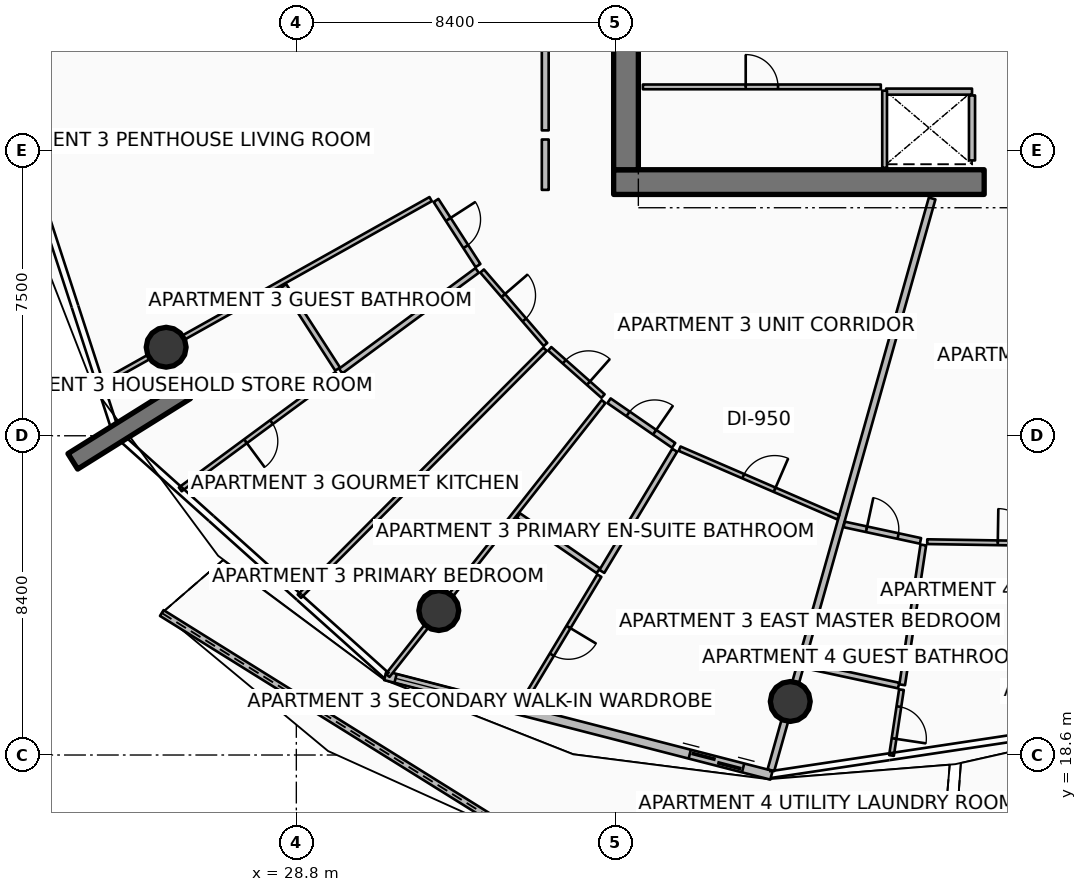
"""IFC4 building model, lengths in metres.
Left out: names, types, materials, properties, quantities, classifications, styles, units other than length and angle.
Written with IfcOpenShell. Run it as: python <this file> out.ifc"""

import sys

from ifc_helpers import new_model, si_unit, direction, frame, frame_2d, origin, origin_2d, place, context, subcontext, project, spatial, polyline, rectangle, circle, outline, extrude, element, fill, save


model = new_model("IFC4")
c1 = context("Model", 3, precision=1e-05, world=origin(), true_north=direction((0.0, 1.0)))
c2 = subcontext(c1, "Body", "Model", "MODEL_VIEW")
j1 = project(units=[si_unit("LENGTHUNIT", "METRE"), si_unit("PLANEANGLEUNIT", "RADIAN")], contexts=[c1])
p1 = place(None, origin())
s1 = spatial("IfcSite", under=j1, at=p1, CompositionType="ELEMENT")
p2 = place(p1, origin())
s2 = spatial("IfcBuilding", under=s1, at=p2, CompositionType="ELEMENT")
p3 = place(p2, frame((0.0, 0.0, 176.55)))
s3 = spatial("IfcBuildingStorey", under=s2, at=p3, CompositionType="ELEMENT", Elevation=176.55)
p4 = place(p3, frame((37.15, 33.675, 0.0), z_axis=(0.0, 0.0, 1.0), x_axis=(1.0, 0.0, 0.0)))
e1 = element("IfcWall", 1, at=p4, inside=s3, PredefinedType="SHEAR", context=c2, shape_type="SweptSolid", body=[
    extrude(rectangle(XDim=9.75, YDim=0.65, at=frame_2d((4.875, 0.0))), origin(), (0.0, 0.0, 1.0), 3.75),
])
p5 = place(p3, frame((37.475, 34.0, 0.0), z_axis=(0.0, 0.0, 1.0), x_axis=(0.0, 1.0, 0.0)))
e2 = element("IfcWall", 2, at=p5, inside=s3, PredefinedType="SHEAR", context=c2, shape_type="SweptSolid", body=[
    extrude(rectangle(XDim=16.0, YDim=0.65, at=frame_2d((8.0, 0.0))), origin(), (0.0, 0.0, 1.0), 3.75),
])
p6 = place(p3, frame((25.886, 28.182, 0.0), z_axis=(0.0, 0.0, 1.0), x_axis=(-0.848033572426, -0.529942506352, 0.0)))
e3 = element("IfcWall", 3, at=p6, inside=s3, PredefinedType="SOLIDWALL", context=c2, shape_type="SweptSolid", body=[
    extrude(rectangle(XDim=3.5, YDim=0.48, at=frame_2d((1.75, 0.0))), origin(), (0.0, 0.0, 1.0), 3.75),
])
for number, where, z_axis, x_axis in (
    (4, (25.375, 29.329, 0.0), (0.0, 0.0, 1.0), (1.0, 0.0, 0.0)),
    (5, (32.549, 22.401, 0.0), (0.0, 0.0, 1.0), (1.0, 0.0, 0.0)),
    (6, (41.798, 20.008, 0.0), (0.0, 0.0, 1.0), (1.0, 0.0, 0.0)),
):
    element("IfcColumn", number, at=place(p3, frame(where, z_axis=z_axis, x_axis=x_axis)), inside=s3, PredefinedType="COLUMN", context=c2, shape_type="SweptSolid", body=[
        extrude(circle(Radius=0.525, at=origin_2d()), origin(), (0.0, 0.0, 1.0), 3.5),
    ])
p7 = place(p3, frame((25.26, 22.336, 0.0), z_axis=(0.0, 0.0, 1.0), x_axis=(0.84875531388, -0.528785795158, 0.0)))
e7 = element("IfcWall", 7, at=p7, inside=s3, PredefinedType="PARAPET", context=c2, shape_type="SweptSolid", body=[
    extrude(outline(polyline([(0.0, 0.0), (11.257, 0.0), (11.257, 1.832), (5.628, 1.696), (0.0, 1.497), (0.0, 0.0)])), frame((0.0, 0.09, 0.0), z_axis=(0.0, -1.0, 0.0), x_axis=(1.0, 0.0, 0.0)), (0.0, 0.0, 1.0), 0.18),
])
p8 = place(p3, frame((46.108, 15.929, 0.0), z_axis=(0.0, 0.0, 1.0), x_axis=(0.954909554677, 0.296896854793, 0.0)))
e8 = element("IfcWall", 8, at=p8, inside=s3, PredefinedType="PARAPET", context=c2, shape_type="SweptSolid", body=[
    extrude(outline(polyline([(0.0, 0.0), (9.736, 0.0), (9.736, 1.348), (4.868, 1.562), (0.0, 1.747), (0.0, 0.0)])), frame((0.0, 0.09, 0.0), z_axis=(0.0, -1.0, 0.0), x_axis=(1.0, 0.0, 0.0)), (0.0, 0.0, 1.0), 0.18),
])
p9 = place(p3, frame((31.14, 20.687, 0.0), z_axis=(0.0, 0.0, 1.0), x_axis=(0.968374028006, -0.249502989727, 0.0)))
e9 = element("IfcWall", 9, at=p9, inside=s3, PredefinedType="SOLIDWALL", context=c2, shape_type="SweptSolid", body=[
    extrude(rectangle(XDim=10.494, YDim=0.24, at=frame_2d((5.247, 0.0))), origin(), (0.0, 0.0, 1.0), 2.45),
])
p10 = place(p9, frame((8.274, 0.0, 0.0)))
e10 = element("IfcOpeningElement", 10, at=p10, cuts=e9, PredefinedType="OPENING", context=c2, shape_type="SweptSolid", body=[
    extrude(rectangle(XDim=1.45, YDim=2.15, at=frame_2d((0.725, 1.075))), frame((0.0, 0.13, 0.0), z_axis=(0.0, -1.0, 0.0), x_axis=(1.0, 0.0, 0.0)), (0.0, 0.0, 1.0), 0.26),
])
p11 = place(p9, frame((0.28, 0.0, 0.65)))
e11 = element("IfcOpeningElement", 11, at=p11, cuts=e9, PredefinedType="OPENING", context=c2, shape_type="SweptSolid", body=[
    extrude(rectangle(XDim=1.6, YDim=1.5, at=frame_2d((0.8, 0.75))), frame((0.0, 0.13, 0.0), z_axis=(0.0, -1.0, 0.0), x_axis=(1.0, 0.0, 0.0)), (0.0, 0.0, 1.0), 0.26),
])
p12 = place(p3, frame((44.32, 36.055, 0.0), z_axis=(0.0, 0.0, 1.0), x_axis=(1.0, 0.0, 0.0)))
e12 = element("IfcWall", 12, at=p12, inside=s3, PredefinedType="PARTITIONING", context=c2, shape_type="SweptSolid", body=[
    extrude(rectangle(XDim=2.26, YDim=0.16, at=frame_2d((1.13, 0.0))), origin(), (0.0, 0.0, 1.0), 3.5),
])
p13 = place(p3, frame((46.58, 34.245, 0.0), z_axis=(0.0, 0.0, 1.0), x_axis=(0.0, 1.0, 0.0)))
e13 = element("IfcWall", 13, at=p13, inside=s3, PredefinedType="PARTITIONING", context=c2, shape_type="SweptSolid", body=[
    extrude(rectangle(XDim=1.71, YDim=0.16, at=frame_2d((0.855, 0.0))), origin(), (0.0, 0.0, 1.0), 3.5),
])
p14 = place(p3, frame((44.28, 34.05, 0.0), z_axis=(0.0, 0.0, 1.0), x_axis=(0.0, 1.0, 0.0)))
e14 = element("IfcWall", 14, at=p14, inside=s3, PredefinedType="PARTITIONING", context=c2, shape_type="SweptSolid", body=[
    extrude(rectangle(XDim=2.03, YDim=0.125, at=frame_2d((1.015, 0.0))), origin(), (0.0, 0.0, 1.0), 2.94),
])
p15 = place(p3, frame((37.92, 36.18, 0.0), z_axis=(0.0, 0.0, 1.0), x_axis=(1.0, 0.0, 0.0)))
e15 = element("IfcWall", 15, at=p15, inside=s3, PredefinedType="PARTITIONING", context=c2, shape_type="SweptSolid", body=[
    extrude(rectangle(XDim=6.26, YDim=0.125, at=frame_2d((3.13, 0.0))), origin(), (0.0, 0.0, 1.0), 2.94),
])
p16 = place(p15, frame((2.705, 0.0, 0.0)))
e16 = element("IfcOpeningElement", 16, at=p16, cuts=e15, PredefinedType="OPENING", context=c2, shape_type="SweptSolid", body=[
    extrude(rectangle(XDim=0.85, YDim=2.06, at=frame_2d((0.425, 1.03))), frame((0.0, 0.073, 0.0), z_axis=(0.0, -1.0, 0.0), x_axis=(1.0, 0.0, 0.0)), (0.0, 0.0, 1.0), 0.145),
])
p17 = place(p3, frame((45.531, 33.244, 0.0), z_axis=(0.0, 0.0, 1.0), x_axis=(-0.271437162306, -0.962456163635, 0.0)))
e17 = element("IfcWall", 17, at=p17, inside=s3, PredefinedType="PARTITIONING", context=c2, shape_type="SweptSolid", body=[
    extrude(rectangle(XDim=15.63, YDim=0.18, at=frame_2d((7.815, 0.0))), origin(), (0.0, 0.0, 1.0), 2.94),
])
p18 = place(p3, frame((35.35, 40.383, 0.0), z_axis=(0.0, 0.0, 1.0), x_axis=(0.0, -1.0, 0.0)))
e18 = element("IfcWall", 18, at=p18, inside=s3, PredefinedType="PARTITIONING", context=c2, shape_type="SweptSolid", body=[
    extrude(rectangle(XDim=5.347, YDim=0.18, at=frame_2d((2.674, 0.0))), origin(), (0.0, 0.0, 1.0), 2.94),
])
p19 = place(p18, frame((2.124, 0.0, 0.0)))
e19 = element("IfcOpeningElement", 19, at=p19, cuts=e18, PredefinedType="OPENING", context=c2, shape_type="SweptSolid", body=[
    extrude(rectangle(XDim=1.1, YDim=2.1, at=frame_2d((0.55, 1.05))), frame((0.0, 0.1, 0.0), z_axis=(0.0, -1.0, 0.0), x_axis=(1.0, 0.0, 0.0)), (0.0, 0.0, 1.0), 0.2),
])
p20 = place(p3, frame((35.35, 34.796, 0.0), z_axis=(0.0, 0.0, 1.0), x_axis=(0.0, -1.0, 0.0)))
e20 = element("IfcWall", 20, at=p20, inside=s3, PredefinedType="PARTITIONING", context=c2, shape_type="SweptSolid", body=[
    extrude(rectangle(XDim=1.326, YDim=0.18, at=frame_2d((0.663, 0.0))), origin(), (0.0, 0.0, 1.0), 2.94),
])
p21 = place(p3, frame((32.334, 33.227, 0.0), z_axis=(0.0, 0.0, 1.0), x_axis=(-0.872500152392, -0.488613839424, 0.0)))
e21 = element("IfcWall", 21, at=p21, inside=s3, PredefinedType="PARTITIONING", context=c2, shape_type="SweptSolid", body=[
    extrude(rectangle(XDim=9.94, YDim=0.125, at=frame_2d((4.97, 0.0))), origin(), (0.0, 0.0, 1.0), 2.94),
])
p22 = place(p3, frame((32.476, 33.192, 0.0), z_axis=(0.0, 0.0, 1.0), x_axis=(0.542143239932, -0.840286086637, 0.0)))
e22 = element("IfcWall", 22, at=p22, inside=s3, PredefinedType="PARTITIONING", context=c2, shape_type="SweptSolid", body=[
    extrude(rectangle(XDim=2.038, YDim=0.15, at=frame_2d((1.019, 0.0))), origin(), (0.0, 0.0, 1.0), 2.94),
])
p23 = place(p22, frame((0.594, 0.0, 0.0)))
e23 = element("IfcOpeningElement", 23, at=p23, cuts=e22, PredefinedType="OPENING", context=c2, shape_type="SweptSolid", body=[
    extrude(rectangle(XDim=0.85, YDim=2.06, at=frame_2d((0.425, 1.03))), frame((0.0, 0.085, 0.0), z_axis=(0.0, -1.0, 0.0), x_axis=(1.0, 0.0, 0.0)), (0.0, 0.0, 1.0), 0.17),
])
p24 = place(p3, frame((28.471, 30.949, 0.0), z_axis=(0.0, 0.0, 1.0), x_axis=(0.542080018781, -0.840326872853, 0.0)))
e24 = element("IfcWall", 24, at=p24, inside=s3, PredefinedType="PARTITIONING", context=c2, shape_type="SweptSolid", body=[
    extrude(rectangle(XDim=2.611, YDim=0.15, at=frame_2d((1.306, 0.0))), origin(), (0.0, 0.0, 1.0), 2.94),
])
p25 = place(p3, frame((33.557, 31.35, 0.0), z_axis=(0.0, 0.0, 1.0), x_axis=(-0.804841149106, -0.593490290322, 0.0)))
e25 = element("IfcWall", 25, at=p25, inside=s3, PredefinedType="PARTITIONING", context=c2, shape_type="SweptSolid", body=[
    extrude(rectangle(XDim=4.46, YDim=0.15, at=frame_2d((2.23, 0.0))), origin(), (0.0, 0.0, 1.0), 2.94),
])
p26 = place(p3, frame((29.863, 28.626, 0.0), z_axis=(0.0, 0.0, 1.0), x_axis=(-0.804842237675, -0.593488814094, 0.0)))
e26 = element("IfcWall", 26, at=p26, inside=s3, PredefinedType="PARTITIONING", context=c2, shape_type="SweptSolid", body=[
    extrude(rectangle(XDim=5.115, YDim=0.125, at=frame_2d((2.558, 0.0))), origin(), (0.0, 0.0, 1.0), 2.94),
])
p27 = place(p26, frame((2.133, 0.0, 0.0)))
e27 = element("IfcOpeningElement", 27, at=p27, cuts=e26, PredefinedType="OPENING", context=c2, shape_type="SweptSolid", body=[
    extrude(rectangle(XDim=0.85, YDim=2.06, at=frame_2d((0.425, 1.03))), frame((0.0, 0.073, 0.0), z_axis=(0.0, -1.0, 0.0), x_axis=(1.0, 0.0, 0.0)), (0.0, 0.0, 1.0), 0.145),
])
p28 = place(p3, frame((35.344, 29.277, 0.0), z_axis=(0.0, 0.0, 1.0), x_axis=(-0.705226489462, -0.708982086206, 0.0)))
e28 = element("IfcWall", 28, at=p28, inside=s3, PredefinedType="PARTITIONING", context=c2, shape_type="SweptSolid", body=[
    extrude(rectangle(XDim=9.166, YDim=0.125, at=frame_2d((4.583, 0.0))), origin(), (0.0, 0.0, 1.0), 2.94),
])
p29 = place(p3, frame((33.688, 31.335, 0.0), z_axis=(0.0, 0.0, 1.0), x_axis=(0.653119308398, -0.757255022431, 0.0)))
e29 = element("IfcWall", 29, at=p29, inside=s3, PredefinedType="PARTITIONING", context=c2, shape_type="SweptSolid", body=[
    extrude(rectangle(XDim=2.553, YDim=0.125, at=frame_2d((1.277, 0.0))), origin(), (0.0, 0.0, 1.0), 2.94),
])
p30 = place(p29, frame((0.852, 0.0, 0.0)))
e30 = element("IfcOpeningElement", 30, at=p30, cuts=e29, PredefinedType="OPENING", context=c2, shape_type="SweptSolid", body=[
    extrude(rectangle(XDim=0.85, YDim=2.06, at=frame_2d((0.425, 1.03))), frame((0.0, 0.073, 0.0), z_axis=(0.0, -1.0, 0.0), x_axis=(1.0, 0.0, 0.0)), (0.0, 0.0, 1.0), 0.145),
])
p31 = place(p3, frame((35.468, 29.288, 0.0), z_axis=(0.0, 0.0, 1.0), x_axis=(0.748399816021, -0.663247853656, 0.0)))
e31 = element("IfcWall", 31, at=p31, inside=s3, PredefinedType="PARTITIONING", context=c2, shape_type="SweptSolid", body=[
    extrude(rectangle(XDim=1.875, YDim=0.125, at=frame_2d((0.938, 0.0))), origin(), (0.0, 0.0, 1.0), 2.94),
])
p32 = place(p31, frame((0.512, 0.0, 0.0)))
e32 = element("IfcOpeningElement", 32, at=p32, cuts=e31, PredefinedType="OPENING", context=c2, shape_type="SweptSolid", body=[
    extrude(rectangle(XDim=0.85, YDim=2.06, at=frame_2d((0.425, 1.03))), frame((0.0, 0.073, 0.0), z_axis=(0.0, -1.0, 0.0), x_axis=(1.0, 0.0, 0.0)), (0.0, 0.0, 1.0), 0.145),
])
p33 = place(p3, frame((36.884, 27.9, 0.0), z_axis=(0.0, 0.0, 1.0), x_axis=(-0.619094580594, -0.785316433216, 0.0)))
e33 = element("IfcWall", 33, at=p33, inside=s3, PredefinedType="PARTITIONING", context=c2, shape_type="SweptSolid", body=[
    extrude(rectangle(XDim=9.175, YDim=0.125, at=frame_2d((4.588, 0.0))), origin(), (0.0, 0.0, 1.0), 2.94),
])
p34 = place(p3, frame((37.028, 27.921, 0.0), z_axis=(0.0, 0.0, 1.0), x_axis=(0.82286796048, -0.56823262808, 0.0)))
e34 = element("IfcWall", 34, at=p34, inside=s3, PredefinedType="PARTITIONING", context=c2, shape_type="SweptSolid", body=[
    extrude(rectangle(XDim=2.066, YDim=0.15, at=frame_2d((1.033, 0.0))), origin(), (0.0, 0.0, 1.0), 2.94),
])
p35 = place(p34, frame((0.608, 0.0, 0.0)))
e35 = element("IfcOpeningElement", 35, at=p35, cuts=e34, PredefinedType="OPENING", context=c2, shape_type="SweptSolid", body=[
    extrude(rectangle(XDim=0.85, YDim=2.06, at=frame_2d((0.425, 1.03))), frame((0.0, 0.085, 0.0), z_axis=(0.0, -1.0, 0.0), x_axis=(1.0, 0.0, 0.0)), (0.0, 0.0, 1.0), 0.17),
])
p36 = place(p3, frame((34.645, 24.898, 0.0), z_axis=(0.0, 0.0, 1.0), x_axis=(0.822814907258, -0.568309447743, 0.0)))
e36 = element("IfcWall", 36, at=p36, inside=s3, PredefinedType="PARTITIONING", context=c2, shape_type="SweptSolid", body=[
    extrude(rectangle(XDim=2.553, YDim=0.15, at=frame_2d((1.276, 0.0))), origin(), (0.0, 0.0, 1.0), 2.94),
])
p37 = place(p3, frame((38.756, 26.619, 0.0), z_axis=(0.0, 0.0, 1.0), x_axis=(-0.515122954907, -0.857116293934, 0.0)))
e37 = element("IfcWall", 37, at=p37, inside=s3, PredefinedType="PARTITIONING", context=c2, shape_type="SweptSolid", body=[
    extrude(rectangle(XDim=3.72, YDim=0.15, at=frame_2d((1.86, 0.0))), origin(), (0.0, 0.0, 1.0), 2.94),
])
p38 = place(p3, frame((36.773, 23.319, 0.0), z_axis=(0.0, 0.0, 1.0), x_axis=(-0.515150775859, -0.857099573056, 0.0)))
e38 = element("IfcWall", 38, at=p38, inside=s3, PredefinedType="PARTITIONING", context=c2, shape_type="SweptSolid", body=[
    extrude(rectangle(XDim=4.0, YDim=0.125, at=frame_2d((2.0, 0.0))), origin(), (0.0, 0.0, 1.0), 2.94),
])
p39 = place(p38, frame((1.575, 0.0, 0.0)))
e39 = element("IfcOpeningElement", 39, at=p39, cuts=e38, PredefinedType="OPENING", context=c2, shape_type="SweptSolid", body=[
    extrude(rectangle(XDim=0.85, YDim=2.06, at=frame_2d((0.425, 1.03))), frame((0.0, 0.073, 0.0), z_axis=(0.0, -1.0, 0.0), x_axis=(1.0, 0.0, 0.0)), (0.0, 0.0, 1.0), 0.145),
])
p40 = place(p3, frame((38.885, 26.66, 0.0), z_axis=(0.0, 0.0, 1.0), x_axis=(0.91789982616, -0.396812183705, 0.0)))
e40 = element("IfcWall", 40, at=p40, inside=s3, PredefinedType="PARTITIONING", context=c2, shape_type="SweptSolid", body=[
    extrude(rectangle(XDim=4.55, YDim=0.125, at=frame_2d((2.275, 0.0))), origin(), (0.0, 0.0, 1.0), 2.94),
])
p41 = place(p40, frame((1.825, 0.0, 0.0)))
e41 = element("IfcOpeningElement", 41, at=p41, cuts=e40, PredefinedType="OPENING", context=c2, shape_type="SweptSolid", body=[
    extrude(rectangle(XDim=0.9, YDim=2.08, at=frame_2d((0.45, 1.04))), frame((0.0, 0.073, 0.0), z_axis=(0.0, -1.0, 0.0), x_axis=(1.0, 0.0, 0.0)), (0.0, 0.0, 1.0), 0.145),
])
p42 = place(p3, frame((43.215, 24.667, 0.0), z_axis=(0.0, 0.0, 1.0), x_axis=(0.977507597701, -0.210900204925, 0.0)))
e42 = element("IfcWall", 42, at=p42, inside=s3, PredefinedType="PARTITIONING", context=c2, shape_type="SweptSolid", body=[
    extrude(rectangle(XDim=2.055, YDim=0.15, at=frame_2d((1.027, 0.0))), origin(), (0.0, 0.0, 1.0), 2.94),
])
p43 = place(p42, frame((0.602, 0.0, 0.0)))
e43 = element("IfcOpeningElement", 43, at=p43, cuts=e42, PredefinedType="OPENING", context=c2, shape_type="SweptSolid", body=[
    extrude(rectangle(XDim=0.85, YDim=2.06, at=frame_2d((0.425, 1.03))), frame((0.0, 0.085, 0.0), z_axis=(0.0, -1.0, 0.0), x_axis=(1.0, 0.0, 0.0)), (0.0, 0.0, 1.0), 0.17),
])
p44 = place(p3, frame((42.17, 20.962, 0.0), z_axis=(0.0, 0.0, 1.0), x_axis=(0.977505473959, -0.210910048076, 0.0)))
e44 = element("IfcWall", 44, at=p44, inside=s3, PredefinedType="PARTITIONING", context=c2, shape_type="SweptSolid", body=[
    extrude(rectangle(XDim=2.535, YDim=0.15, at=frame_2d((1.268, 0.0))), origin(), (0.0, 0.0, 1.0), 2.94),
])
p45 = place(p3, frame((45.298, 24.126, 0.0), z_axis=(0.0, 0.0, 1.0), x_axis=(-0.149437927454, -0.988771108922, 0.0)))
e45 = element("IfcWall", 45, at=p45, inside=s3, PredefinedType="PARTITIONING", context=c2, shape_type="SweptSolid", body=[
    extrude(rectangle(XDim=3.72, YDim=0.15, at=frame_2d((1.86, 0.0))), origin(), (0.0, 0.0, 1.0), 2.94),
])
p46 = place(p3, frame((44.723, 20.319, 0.0), z_axis=(0.0, 0.0, 1.0), x_axis=(-0.14945844671, -0.988768007526, 0.0)))
e46 = element("IfcWall", 46, at=p46, inside=s3, PredefinedType="PARTITIONING", context=c2, shape_type="SweptSolid", body=[
    extrude(rectangle(XDim=1.751, YDim=0.125, at=frame_2d((0.875, 0.0))), origin(), (0.0, 0.0, 1.0), 2.94),
])
p47 = place(p46, frame((0.451, 0.0, 0.0)))
e47 = element("IfcOpeningElement", 47, at=p47, cuts=e46, PredefinedType="OPENING", context=c2, shape_type="SweptSolid", body=[
    extrude(rectangle(XDim=0.85, YDim=2.06, at=frame_2d((0.425, 1.03))), frame((0.0, 0.073, 0.0), z_axis=(0.0, -1.0, 0.0), x_axis=(1.0, 0.0, 0.0)), (0.0, 0.0, 1.0), 0.145),
])
p48 = place(p3, frame((45.402, 24.214, 0.0), z_axis=(0.0, 0.0, 1.0), x_axis=(0.999870557478, -0.016089384368, 0.0)))
e48 = element("IfcWall", 48, at=p48, inside=s3, PredefinedType="PARTITIONING", context=c2, shape_type="SweptSolid", body=[
    extrude(rectangle(XDim=4.613, YDim=0.125, at=frame_2d((2.306, 0.0))), origin(), (0.0, 0.0, 1.0), 2.94),
])
p49 = place(p48, frame((1.856, 0.0, 0.0)))
e49 = element("IfcOpeningElement", 49, at=p49, cuts=e48, PredefinedType="OPENING", context=c2, shape_type="SweptSolid", body=[
    extrude(rectangle(XDim=0.9, YDim=2.08, at=frame_2d((0.45, 1.04))), frame((0.0, 0.073, 0.0), z_axis=(0.0, -1.0, 0.0), x_axis=(1.0, 0.0, 0.0)), (0.0, 0.0, 1.0), 0.145),
])
p50 = place(p10, origin())
e50 = element("IfcDoor", 50, at=p50, inside=s3, OperationType="DOUBLE_DOOR_SLIDING", PredefinedType="DOOR", context=c2, shape_type="SweptSolid", body=[
    extrude(rectangle(XDim=1.45, YDim=2.15, at=frame_2d((0.725, 1.075))), frame((0.0, 0.025, 0.0), z_axis=(0.0, -1.0, 0.0), x_axis=(1.0, 0.0, 0.0)), (0.0, 0.0, 1.0), 0.05),
])
fill(e10, e50)
p51 = place(p11, origin())
e51 = element("IfcWindow", 51, at=p51, inside=s3, PartitioningType="SINGLE_PANEL", PredefinedType="WINDOW", context=c2, shape_type="SweptSolid", body=[
    extrude(rectangle(XDim=1.6, YDim=1.5, at=frame_2d((0.8, 0.75))), frame((0.0, 0.03, 0.0), z_axis=(0.0, -1.0, 0.0), x_axis=(1.0, 0.0, 0.0)), (0.0, 0.0, 1.0), 0.06),
])
fill(e11, e51)
p52 = place(p16, origin())
e52 = element("IfcDoor", 52, at=p52, inside=s3, OperationType="SINGLE_SWING_LEFT", PredefinedType="DOOR", context=c2, shape_type="SweptSolid", body=[
    extrude(rectangle(XDim=0.85, YDim=2.06, at=frame_2d((0.425, 1.03))), frame((0.0, 0.025, 0.0), z_axis=(0.0, -1.0, 0.0), x_axis=(1.0, 0.0, 0.0)), (0.0, 0.0, 1.0), 0.05),
])
fill(e16, e52)
p53 = place(p23, origin())
e53 = element("IfcDoor", 53, at=p53, inside=s3, OperationType="SINGLE_SWING_LEFT", PredefinedType="DOOR", context=c2, shape_type="SweptSolid", body=[
    extrude(rectangle(XDim=0.85, YDim=2.06, at=frame_2d((0.425, 1.03))), frame((0.0, 0.025, 0.0), z_axis=(0.0, -1.0, 0.0), x_axis=(1.0, 0.0, 0.0)), (0.0, 0.0, 1.0), 0.05),
])
fill(e23, e53)
p54 = place(p27, origin())
e54 = element("IfcDoor", 54, at=p54, inside=s3, OperationType="SINGLE_SWING_RIGHT", PredefinedType="DOOR", context=c2, shape_type="SweptSolid", body=[
    extrude(rectangle(XDim=0.85, YDim=2.06, at=frame_2d((0.425, 1.03))), frame((0.0, 0.025, 0.0), z_axis=(0.0, -1.0, 0.0), x_axis=(1.0, 0.0, 0.0)), (0.0, 0.0, 1.0), 0.05),
])
fill(e27, e54)
p55 = place(p30, origin())
e55 = element("IfcDoor", 55, at=p55, inside=s3, OperationType="SINGLE_SWING_LEFT", PredefinedType="DOOR", context=c2, shape_type="SweptSolid", body=[
    extrude(rectangle(XDim=0.85, YDim=2.06, at=frame_2d((0.425, 1.03))), frame((0.0, 0.025, 0.0), z_axis=(0.0, -1.0, 0.0), x_axis=(1.0, 0.0, 0.0)), (0.0, 0.0, 1.0), 0.05),
])
fill(e30, e55)
p56 = place(p32, origin())
e56 = element("IfcDoor", 56, at=p56, inside=s3, OperationType="SINGLE_SWING_RIGHT", PredefinedType="DOOR", context=c2, shape_type="SweptSolid", body=[
    extrude(rectangle(XDim=0.85, YDim=2.06, at=frame_2d((0.425, 1.03))), frame((0.0, 0.025, 0.0), z_axis=(0.0, -1.0, 0.0), x_axis=(1.0, 0.0, 0.0)), (0.0, 0.0, 1.0), 0.05),
])
fill(e32, e56)
p57 = place(p35, origin())
e57 = element("IfcDoor", 57, at=p57, inside=s3, OperationType="SINGLE_SWING_RIGHT", PredefinedType="DOOR", context=c2, shape_type="SweptSolid", body=[
    extrude(rectangle(XDim=0.85, YDim=2.06, at=frame_2d((0.425, 1.03))), frame((0.0, 0.025, 0.0), z_axis=(0.0, -1.0, 0.0), x_axis=(1.0, 0.0, 0.0)), (0.0, 0.0, 1.0), 0.05),
])
fill(e35, e57)
p58 = place(p39, origin())
e58 = element("IfcDoor", 58, at=p58, inside=s3, OperationType="SINGLE_SWING_LEFT", PredefinedType="DOOR", context=c2, shape_type="SweptSolid", body=[
    extrude(rectangle(XDim=0.85, YDim=2.06, at=frame_2d((0.425, 1.03))), frame((0.0, 0.025, 0.0), z_axis=(0.0, -1.0, 0.0), x_axis=(1.0, 0.0, 0.0)), (0.0, 0.0, 1.0), 0.05),
])
fill(e39, e58)
p59 = place(p41, origin())
e59 = element("IfcDoor", 59, at=p59, inside=s3, OperationType="SINGLE_SWING_RIGHT", PredefinedType="DOOR", context=c2, shape_type="SweptSolid", body=[
    extrude(rectangle(XDim=0.9, YDim=2.08, at=frame_2d((0.45, 1.04))), frame((0.0, 0.025, 0.0), z_axis=(0.0, -1.0, 0.0), x_axis=(1.0, 0.0, 0.0)), (0.0, 0.0, 1.0), 0.05),
])
fill(e41, e59)
p60 = place(p43, origin())
e60 = element("IfcDoor", 60, at=p60, inside=s3, OperationType="SINGLE_SWING_LEFT", PredefinedType="DOOR", context=c2, shape_type="SweptSolid", body=[
    extrude(rectangle(XDim=0.85, YDim=2.06, at=frame_2d((0.425, 1.03))), frame((0.0, 0.025, 0.0), z_axis=(0.0, -1.0, 0.0), x_axis=(1.0, 0.0, 0.0)), (0.0, 0.0, 1.0), 0.05),
])
fill(e43, e60)
p61 = place(p47, origin())
e61 = element("IfcDoor", 61, at=p61, inside=s3, OperationType="SINGLE_SWING_RIGHT", PredefinedType="DOOR", context=c2, shape_type="SweptSolid", body=[
    extrude(rectangle(XDim=0.85, YDim=2.06, at=frame_2d((0.425, 1.03))), frame((0.0, 0.025, 0.0), z_axis=(0.0, -1.0, 0.0), x_axis=(1.0, 0.0, 0.0)), (0.0, 0.0, 1.0), 0.05),
])
fill(e47, e61)
p62 = place(p49, origin())
e62 = element("IfcDoor", 62, at=p62, inside=s3, OperationType="SINGLE_SWING_LEFT", PredefinedType="DOOR", context=c2, shape_type="SweptSolid", body=[
    extrude(rectangle(XDim=0.9, YDim=2.08, at=frame_2d((0.45, 1.04))), frame((0.0, 0.025, 0.0), z_axis=(0.0, -1.0, 0.0), x_axis=(1.0, 0.0, 0.0)), (0.0, 0.0, 1.0), 0.05),
])
fill(e49, e62)
save(model, sys.argv[1])
